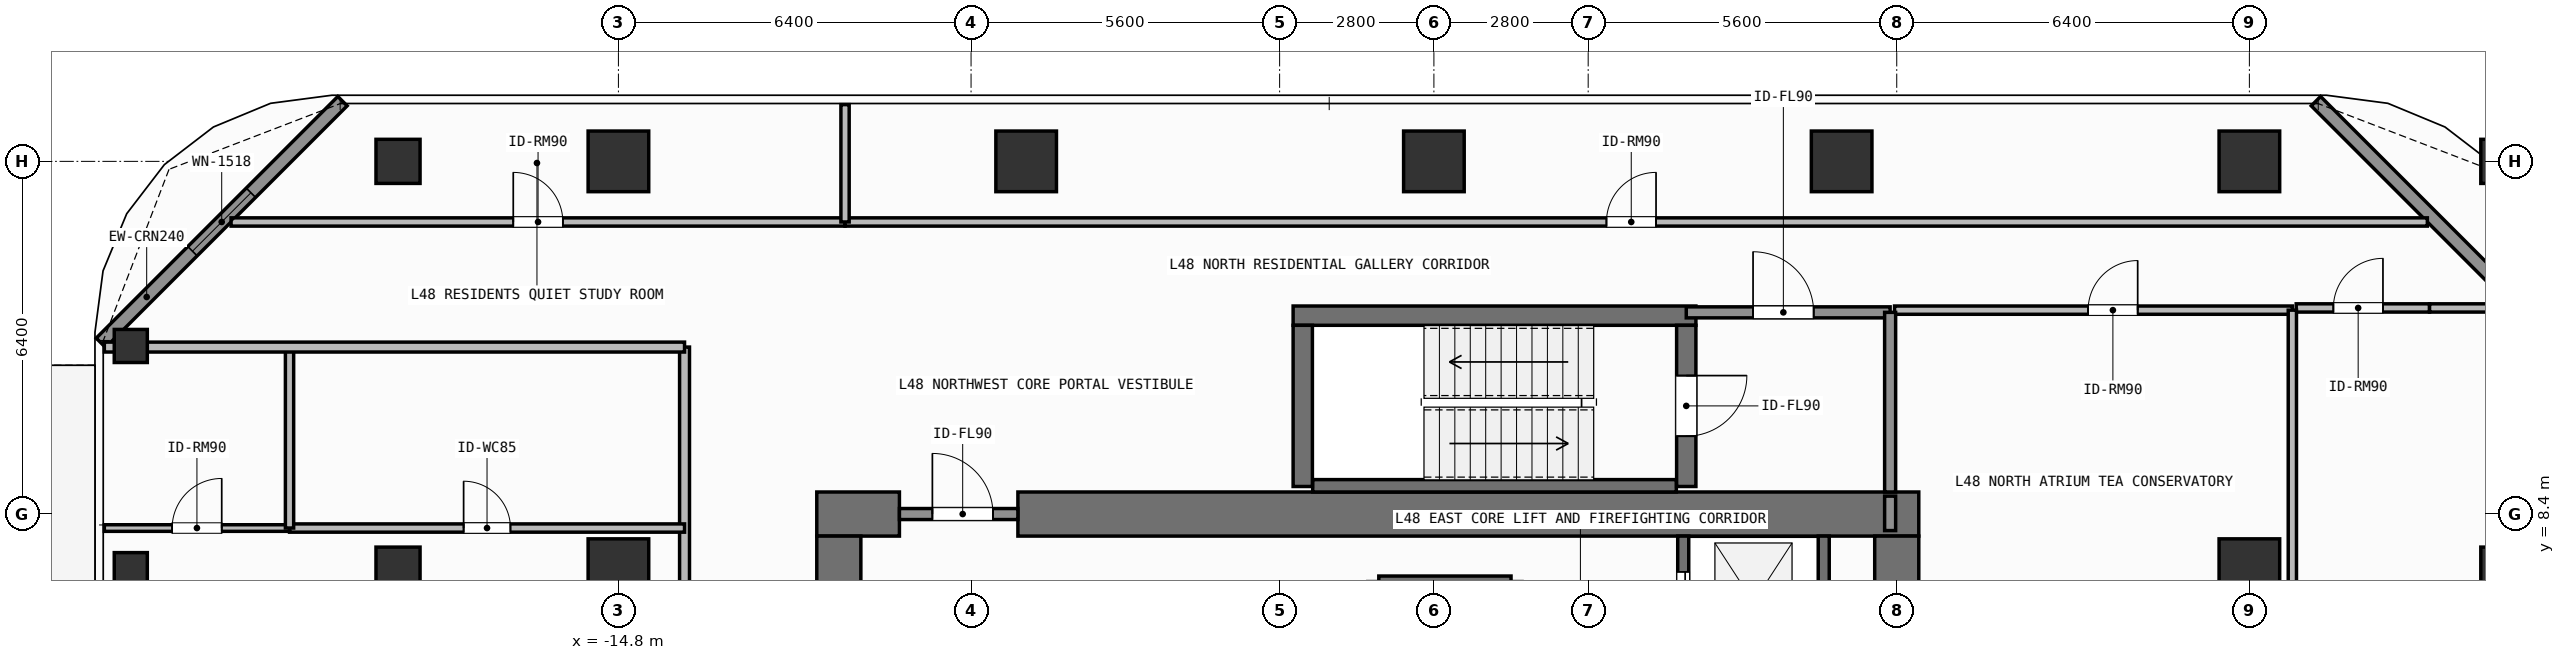
"""IFC4 building model, lengths in metres.
Left out: names, types, materials, properties, quantities, classifications, styles, units other than length and angle.
Written with IfcOpenShell. Run it as: python <this file> out.ifc"""

import sys

from ifc_helpers import new_model, si_unit, direction, frame, frame_2d, origin, origin_2d, place, context, subcontext, project, spatial, rectangle, hollow_rectangle, extrude, element, fill, save


model = new_model("IFC4")
c1 = context("Model", 3, precision=1e-05, world=origin(), true_north=direction((0.0, 1.0)))
c2 = subcontext(c1, "Body", "Model", "MODEL_VIEW")
j1 = project(units=[si_unit("LENGTHUNIT", "METRE"), si_unit("PLANEANGLEUNIT", "RADIAN")], contexts=[c1])
p1 = place(None, origin())
s1 = spatial("IfcSite", under=j1, at=p1, CompositionType="ELEMENT")
p2 = place(p1, origin())
s2 = spatial("IfcBuilding", under=s1, at=p2, CompositionType="ELEMENT")
p3 = place(p2, frame((0.0, 0.0, 195.3)))
s3 = spatial("IfcBuildingStorey", under=s2, at=p3, CompositionType="ELEMENT", Elevation=195.3)
p4 = place(p3, frame((-11.2, 8.4, 0.0), z_axis=(0.0, 0.0, 1.0), x_axis=(1.0, 0.0, 0.0)))
e1 = element("IfcWall", 1, at=p4, inside=s3, PredefinedType="SHEAR", context=c2, shape_type="SweptSolid", body=[
    extrude(rectangle(XDim=1.5, YDim=0.8, at=frame_2d((0.75, 0.0))), origin(), (0.0, 0.0, 1.0), 3.9),
])
p5 = place(p3, frame((-7.55, 8.4, 0.0), z_axis=(0.0, 0.0, 1.0), x_axis=(1.0, 0.0, 0.0)))
e2 = element("IfcWall", 2, at=p5, inside=s3, PredefinedType="SHEAR", context=c2, shape_type="SweptSolid", body=[
    extrude(rectangle(XDim=16.35, YDim=0.8, at=frame_2d((8.175, 0.0))), origin(), (0.0, 0.0, 1.0), 3.9),
])
p6 = place(p3, frame((-10.8, -8.0, 0.0), z_axis=(0.0, 0.0, 1.0), x_axis=(0.0, 1.0, 0.0)))
e3 = element("IfcWall", 3, at=p6, inside=s3, PredefinedType="SHEAR", context=c2, shape_type="SweptSolid", body=[
    extrude(rectangle(XDim=16.0, YDim=0.8, at=frame_2d((8.0, 0.0))), origin(), (0.0, 0.0, 1.0), 3.9),
])
p7 = place(p3, frame((8.4, 5.825, 0.0), z_axis=(0.0, 0.0, 1.0), x_axis=(0.0, 1.0, 0.0)))
e4 = element("IfcWall", 4, at=p7, inside=s3, PredefinedType="SHEAR", context=c2, shape_type="SweptSolid", body=[
    extrude(rectangle(XDim=2.175, YDim=0.8, at=frame_2d((1.087, 0.0))), origin(), (0.0, 0.0, 1.0), 3.9),
])
p8 = place(p3, frame((-2.555, 12.0, 0.0), z_axis=(0.0, 0.0, 1.0), x_axis=(1.0, 0.0, 0.0)))
e5 = element("IfcWall", 5, at=p8, inside=s3, PredefinedType="SHEAR", context=c2, shape_type="SweptSolid", body=[
    extrude(rectangle(XDim=7.31, YDim=0.35, at=frame_2d((3.655, 0.0))), origin(), (0.0, 0.0, 1.0), 3.9),
])
p9 = place(p3, frame((-2.2, 8.913, 0.0), z_axis=(0.0, 0.0, 1.0), x_axis=(1.0, 0.0, 0.0)))
e6 = element("IfcWall", 6, at=p9, inside=s3, PredefinedType="SHEAR", context=c2, shape_type="SweptSolid", body=[
    extrude(rectangle(XDim=6.6, YDim=0.225, at=frame_2d((3.3, 0.0))), origin(), (0.0, 0.0, 1.0), 3.9),
])
p10 = place(p3, frame((-2.38, 8.9, 0.0), z_axis=(0.0, 0.0, 1.0), x_axis=(0.0, 1.0, 0.0)))
e7 = element("IfcWall", 7, at=p10, inside=s3, PredefinedType="SHEAR", context=c2, shape_type="SweptSolid", body=[
    extrude(rectangle(XDim=2.925, YDim=0.35, at=frame_2d((1.462, 0.0))), origin(), (0.0, 0.0, 1.0), 3.9),
])
p11 = place(p3, frame((4.58, 11.825, 0.0), z_axis=(0.0, 0.0, 1.0), x_axis=(0.0, -1.0, 0.0)))
e8 = element("IfcWall", 8, at=p11, inside=s3, PredefinedType="SHEAR", context=c2, shape_type="SweptSolid", body=[
    extrude(rectangle(XDim=2.925, YDim=0.35, at=frame_2d((1.462, 0.0))), origin(), (0.0, 0.0, 1.0), 3.9),
])
p12 = place(p11, frame((0.913, 0.0, 0.0)))
e9 = element("IfcOpeningElement", 9, at=p12, cuts=e8, PredefinedType="OPENING", context=c2, shape_type="SweptSolid", body=[
    extrude(rectangle(XDim=1.1, YDim=2.15, at=frame_2d((0.55, 1.075))), frame((0.0, 0.185, 0.0), z_axis=(0.0, -1.0, 0.0), x_axis=(1.0, 0.0, 0.0)), (0.0, 0.0, 1.0), 0.37),
])
for number, where, z_axis, x_axis in (
    (10, (-14.8, 14.8, 0.0), (0.0, 0.0, 1.0), (1.0, 0.0, 0.0)),
    (11, (-7.4, 14.8, 0.0), (0.0, 0.0, 1.0), (1.0, 0.0, 0.0)),
    (12, (0.0, 14.8, 0.0), (0.0, 0.0, 1.0), (1.0, 0.0, 0.0)),
    (13, (7.4, 14.8, 0.0), (0.0, 0.0, 1.0), (1.0, 0.0, 0.0)),
    (14, (14.8, 14.8, 0.0), (0.0, 0.0, 1.0), (1.0, 0.0, 0.0)),
    (15, (-14.8, 7.4, 0.0), (0.0, 0.0, 1.0), (1.0, 0.0, 0.0)),
    (16, (14.8, 7.4, 0.0), (0.0, 0.0, 1.0), (1.0, 0.0, 0.0)),
):
    element("IfcColumn", number, at=place(p3, frame(where, z_axis=z_axis, x_axis=x_axis)), inside=s3, PredefinedType="COLUMN", context=c2, shape_type="SweptSolid", body=[
        extrude(rectangle(XDim=1.1, YDim=1.1, at=origin_2d()), origin(), (0.0, 0.0, 1.0), 3.9),
    ])
for number, where, z_axis, x_axis in (
    (17, (-18.8, 7.4, 0.0), (0.0, 0.0, 1.0), (1.0, 0.0, 0.0)),
    (18, (-18.8, 14.8, 0.0), (0.0, 0.0, 1.0), (1.0, 0.0, 0.0)),
    (19, (19.4, 7.4, 0.0), (0.0, 0.0, 1.0), (1.0, 0.0, 0.0)),
    (20, (19.4, 14.8, 0.0), (0.0, 0.0, 1.0), (1.0, 0.0, 0.0)),
):
    element("IfcColumn", number, at=place(p3, frame(where, z_axis=z_axis, x_axis=x_axis)), inside=s3, PredefinedType="COLUMN", context=c2, shape_type="SweptSolid", body=[
        extrude(hollow_rectangle(XDim=0.8, YDim=0.8, WallThickness=0.036, at=origin_2d()), origin(), (0.0, 0.0, 1.0), 3.9),
    ])
for number, where, z_axis, x_axis in (
    (21, (-23.65, 11.45, 0.0), (0.0, 0.0, 1.0), (1.0, 0.0, 0.0)),
    (22, (-23.65, 7.4, 0.0), (0.0, 0.0, 1.0), (1.0, 0.0, 0.0)),
):
    element("IfcColumn", number, at=place(p3, frame(where, z_axis=z_axis, x_axis=x_axis)), inside=s3, PredefinedType="COLUMN", context=c2, shape_type="SweptSolid", body=[
        extrude(hollow_rectangle(XDim=0.6, YDim=0.6, WallThickness=0.028, at=origin_2d()), origin(), (0.0, 0.0, 1.0), 3.9),
    ])
p13 = place(p3, frame((-24.192, 11.508, 0.0), z_axis=(0.0, 0.0, 1.0), x_axis=(0.707106781187, 0.707106781187, 0.0)))
e23 = element("IfcWall", 23, at=p13, inside=s3, PredefinedType="SOLIDWALL", context=c2, shape_type="SweptSolid", body=[
    extrude(rectangle(XDim=6.201, YDim=0.24, at=frame_2d((3.101, 0.0))), origin(), (0.0, 0.0, 1.0), 3.68),
])
p14 = place(p13, frame((2.351, 0.0, 0.8)))
e24 = element("IfcOpeningElement", 24, at=p14, cuts=e23, PredefinedType="OPENING", context=c2, shape_type="SweptSolid", body=[
    extrude(rectangle(XDim=1.5, YDim=1.85, at=frame_2d((0.75, 0.925))), frame((0.0, 0.13, 0.0), z_axis=(0.0, -1.0, 0.0), x_axis=(1.0, 0.0, 0.0)), (0.0, 0.0, 1.0), 0.26),
])
p15 = place(p3, frame((16.008, 15.892, 0.0), z_axis=(0.0, 0.0, 1.0), x_axis=(0.707106781187, -0.707106781187, 0.0)))
e25 = element("IfcWall", 25, at=p15, inside=s3, PredefinedType="SOLIDWALL", context=c2, shape_type="SweptSolid", body=[
    extrude(rectangle(XDim=6.201, YDim=0.24, at=frame_2d((3.101, 0.0))), origin(), (0.0, 0.0, 1.0), 3.68),
])
p16 = place(p3, frame((-1.0, 7.175, 0.0), z_axis=(0.0, 0.0, 1.0), x_axis=(1.0, 0.0, 0.0)))
e26 = element("IfcWall", 26, at=p16, inside=s3, PredefinedType="SHEAR", context=c2, shape_type="SweptSolid", body=[
    extrude(rectangle(XDim=2.4, YDim=0.2, at=frame_2d((1.2, 0.0))), origin(), (0.0, 0.0, 1.0), 3.68),
])
p17 = place(p3, frame((4.525, 5.825, 0.0), z_axis=(0.0, 0.0, 1.0), x_axis=(0.0, 1.0, 0.0)))
e27 = element("IfcWall", 27, at=p17, inside=s3, PredefinedType="SHEAR", context=c2, shape_type="SweptSolid", body=[
    extrude(rectangle(XDim=2.175, YDim=0.2, at=frame_2d((1.087, 0.0))), origin(), (0.0, 0.0, 1.0), 3.68),
])
p18 = place(p17, frame((0.425, 0.0, 0.0)))
e28 = element("IfcOpeningElement", 28, at=p18, cuts=e27, PredefinedType="OPENING", context=c2, shape_type="SweptSolid", body=[
    extrude(rectangle(XDim=1.1, YDim=2.2, at=frame_2d((0.55, 1.1))), frame((0.0, 0.11, 0.0), z_axis=(0.0, -1.0, 0.0), x_axis=(1.0, 0.0, 0.0)), (0.0, 0.0, 1.0), 0.22),
])
p19 = place(p3, frame((7.075, 5.825, 0.0), z_axis=(0.0, 0.0, 1.0), x_axis=(0.0, 1.0, 0.0)))
e29 = element("IfcWall", 29, at=p19, inside=s3, PredefinedType="SHEAR", context=c2, shape_type="SweptSolid", body=[
    extrude(rectangle(XDim=2.175, YDim=0.2, at=frame_2d((1.087, 0.0))), origin(), (0.0, 0.0, 1.0), 3.68),
])
p20 = place(p3, frame((4.58, 12.06, 0.0), z_axis=(0.0, 0.0, 1.0), x_axis=(1.0, 0.0, 0.0)))
e30 = element("IfcWall", 30, at=p20, inside=s3, PredefinedType="SOLIDWALL", context=c2, shape_type="SweptSolid", body=[
    extrude(rectangle(XDim=3.7, YDim=0.2, at=frame_2d((1.85, 0.0))), origin(), (0.0, 0.0, 1.0), 3.68),
])
p21 = place(p20, frame((1.212, 0.0, 0.0)))
e31 = element("IfcOpeningElement", 31, at=p21, cuts=e30, PredefinedType="OPENING", context=c2, shape_type="SweptSolid", body=[
    extrude(rectangle(XDim=1.1, YDim=2.15, at=frame_2d((0.55, 1.075))), frame((0.0, 0.11, 0.0), z_axis=(0.0, -1.0, 0.0), x_axis=(1.0, 0.0, 0.0)), (0.0, 0.0, 1.0), 0.22),
])
p22 = place(p3, frame((-9.7, 8.4, 0.0), z_axis=(0.0, 0.0, 1.0), x_axis=(1.0, 0.0, 0.0)))
e32 = element("IfcWall", 32, at=p22, inside=s3, PredefinedType="SOLIDWALL", context=c2, shape_type="SweptSolid", body=[
    extrude(rectangle(XDim=2.15, YDim=0.2, at=frame_2d((1.075, 0.0))), origin(), (0.0, 0.0, 1.0), 2.82),
])
p23 = place(p22, frame((0.598, 0.0, 0.0)))
e33 = element("IfcOpeningElement", 33, at=p23, cuts=e32, PredefinedType="OPENING", context=c2, shape_type="SweptSolid", body=[
    extrude(rectangle(XDim=1.1, YDim=2.15, at=frame_2d((0.55, 1.075))), frame((0.0, 0.11, 0.0), z_axis=(0.0, -1.0, 0.0), x_axis=(1.0, 0.0, 0.0)), (0.0, 0.0, 1.0), 0.22),
])
p24 = place(p3, frame((8.36, 12.1, 0.0), z_axis=(0.0, 0.0, 1.0), x_axis=(1.0, 0.0, 0.0)))
e34 = element("IfcWall", 34, at=p24, inside=s3, PredefinedType="PARTITIONING", context=c2, shape_type="SweptSolid", body=[
    extrude(rectangle(XDim=7.22, YDim=0.15, at=frame_2d((3.61, 0.0))), origin(), (0.0, 0.0, 1.0), 3.68),
])
p25 = place(p24, frame((3.513, 0.0, 0.0)))
e35 = element("IfcOpeningElement", 35, at=p25, cuts=e34, PredefinedType="OPENING", context=c2, shape_type="SweptSolid", body=[
    extrude(rectangle(XDim=0.9, YDim=2.1, at=frame_2d((0.45, 1.05))), frame((0.0, 0.085, 0.0), z_axis=(0.0, -1.0, 0.0), x_axis=(1.0, 0.0, 0.0)), (0.0, 0.0, 1.0), 0.17),
])
p26 = place(p3, frame((-21.83, 13.7, 0.0), z_axis=(0.0, 0.0, 1.0), x_axis=(1.0, 0.0, 0.0)))
e36 = element("IfcWall", 36, at=p26, inside=s3, PredefinedType="PARTITIONING", context=c2, shape_type="SweptSolid", body=[
    extrude(rectangle(XDim=11.143, YDim=0.15, at=frame_2d((5.572, 0.0))), origin(), (0.0, 0.0, 1.0), 3.68),
])
p27 = place(p26, frame((5.122, 0.0, 0.0)))
e37 = element("IfcOpeningElement", 37, at=p27, cuts=e36, PredefinedType="OPENING", context=c2, shape_type="SweptSolid", body=[
    extrude(rectangle(XDim=0.9, YDim=2.1, at=frame_2d((0.45, 1.05))), frame((0.0, 0.085, 0.0), z_axis=(0.0, -1.0, 0.0), x_axis=(1.0, 0.0, 0.0)), (0.0, 0.0, 1.0), 0.17),
])
p28 = place(p3, frame((-10.687, 13.7, 0.0), z_axis=(0.0, 0.0, 1.0), x_axis=(1.0, 0.0, 0.0)))
e38 = element("IfcWall", 38, at=p28, inside=s3, PredefinedType="PARTITIONING", context=c2, shape_type="SweptSolid", body=[
    extrude(rectangle(XDim=28.717, YDim=0.15, at=frame_2d((14.358, 0.0))), origin(), (0.0, 0.0, 1.0), 3.68),
])
p29 = place(p28, frame((13.819, 0.0, 0.0)))
e39 = element("IfcOpeningElement", 39, at=p29, cuts=e38, PredefinedType="OPENING", context=c2, shape_type="SweptSolid", body=[
    extrude(rectangle(XDim=0.9, YDim=2.1, at=frame_2d((0.45, 1.05))), frame((0.0, 0.085, 0.0), z_axis=(0.0, -1.0, 0.0), x_axis=(1.0, 0.0, 0.0)), (0.0, 0.0, 1.0), 0.17),
])
p30 = place(p3, frame((-13.6, 0.644, 0.0), z_axis=(0.0, 0.0, 1.0), x_axis=(0.0, 1.0, 0.0)))
e40 = element("IfcWall", 40, at=p30, inside=s3, PredefinedType="PARTITIONING", context=c2, shape_type="SweptSolid", body=[
    extrude(rectangle(XDim=10.786, YDim=0.18, at=frame_2d((5.393, 0.0))), origin(), (0.0, 0.0, 1.0), 3.68),
])
p31 = place(p30, frame((4.982, 0.0, 0.0)))
e41 = element("IfcOpeningElement", 41, at=p31, cuts=e40, PredefinedType="OPENING", context=c2, shape_type="SweptSolid", body=[
    extrude(rectangle(XDim=1.0, YDim=2.2, at=frame_2d((0.5, 1.1))), frame((0.0, 0.1, 0.0), z_axis=(0.0, -1.0, 0.0), x_axis=(1.0, 0.0, 0.0)), (0.0, 0.0, 1.0), 0.2),
])
p32 = place(p3, frame((-20.769, 8.146, 0.0), z_axis=(0.0, 0.0, 1.0), x_axis=(1.0, 0.0, 0.0)))
e42 = element("IfcWall", 42, at=p32, inside=s3, PredefinedType="PARTITIONING", context=c2, shape_type="SweptSolid", body=[
    extrude(rectangle(XDim=7.169, YDim=0.15, at=frame_2d((3.584, 0.0))), origin(), (0.0, 0.0, 1.0), 3.68),
])
p33 = place(p32, frame((3.159, 0.0, 0.0)))
e43 = element("IfcOpeningElement", 43, at=p33, cuts=e42, PredefinedType="OPENING", context=c2, shape_type="SweptSolid", body=[
    extrude(rectangle(XDim=0.85, YDim=2.1, at=frame_2d((0.425, 1.05))), frame((0.0, 0.085, 0.0), z_axis=(0.0, -1.0, 0.0), x_axis=(1.0, 0.0, 0.0)), (0.0, 0.0, 1.0), 0.17),
])
p34 = place(p3, frame((-24.13, 8.146, 0.0), z_axis=(0.0, 0.0, 1.0), x_axis=(1.0, 0.0, 0.0)))
e44 = element("IfcWall", 44, at=p34, inside=s3, PredefinedType="PARTITIONING", context=c2, shape_type="SweptSolid", body=[
    extrude(rectangle(XDim=3.361, YDim=0.12, at=frame_2d((1.68, 0.0))), origin(), (0.0, 0.0, 1.0), 3.68),
])
p35 = place(p34, frame((1.23, 0.0, 0.0)))
e45 = element("IfcOpeningElement", 45, at=p35, cuts=e44, PredefinedType="OPENING", context=c2, shape_type="SweptSolid", body=[
    extrude(rectangle(XDim=0.9, YDim=2.1, at=frame_2d((0.45, 1.05))), frame((0.0, 0.07, 0.0), z_axis=(0.0, -1.0, 0.0), x_axis=(1.0, 0.0, 0.0)), (0.0, 0.0, 1.0), 0.14),
])
p36 = place(p3, frame((15.65, 12.14, 0.0), z_axis=(0.0, 0.0, 1.0), x_axis=(1.0, 0.0, 0.0)))
e46 = element("IfcWall", 46, at=p36, inside=s3, PredefinedType="PARTITIONING", context=c2, shape_type="SweptSolid", body=[
    extrude(rectangle(XDim=2.42, YDim=0.15, at=frame_2d((1.21, 0.0))), origin(), (0.0, 0.0, 1.0), 3.68),
])
p37 = place(p36, frame((0.674, 0.0, 0.0)))
e47 = element("IfcOpeningElement", 47, at=p37, cuts=e46, PredefinedType="OPENING", context=c2, shape_type="SweptSolid", body=[
    extrude(rectangle(XDim=0.9, YDim=2.1, at=frame_2d((0.45, 1.05))), frame((0.0, 0.085, 0.0), z_axis=(0.0, -1.0, 0.0), x_axis=(1.0, 0.0, 0.0)), (0.0, 0.0, 1.0), 0.17),
])
p38 = place(p3, frame((8.28, 8.8, 0.0), z_axis=(0.0, 0.0, 1.0), x_axis=(0.0, 1.0, 0.0)))
e48 = element("IfcWall", 48, at=p38, inside=s3, PredefinedType="SOLIDWALL", context=c2, shape_type="SweptSolid", body=[
    extrude(rectangle(XDim=3.26, YDim=0.2, at=frame_2d((1.63, 0.0))), origin(), (0.0, 0.0, 1.0), 3.68),
])
p39 = place(p3, frame((8.28, 8.1, 0.0), z_axis=(0.0, 0.0, 1.0), x_axis=(0.0, 1.0, 0.0)))
e49 = element("IfcWall", 49, at=p39, inside=s3, PredefinedType="SOLIDWALL", context=c2, shape_type="SweptSolid", body=[
    extrude(rectangle(XDim=0.625, YDim=0.2, at=frame_2d((0.312, 0.0))), origin(), (0.0, 0.0, 1.0), 3.68),
])
p40 = place(p3, frame((15.58, 5.85, 0.0), z_axis=(0.0, 0.0, 1.0), x_axis=(0.0, 1.0, 0.0)))
e50 = element("IfcWall", 50, at=p40, inside=s3, PredefinedType="PARTITIONING", context=c2, shape_type="SweptSolid", body=[
    extrude(rectangle(XDim=6.25, YDim=0.15, at=frame_2d((3.125, 0.0))), origin(), (0.0, 0.0, 1.0), 3.68),
])
p41 = place(p3, frame((-10.687, 13.7, 0.0), z_axis=(0.0, 0.0, 1.0), x_axis=(0.0, 1.0, 0.0)))
e51 = element("IfcWall", 51, at=p41, inside=s3, PredefinedType="PARTITIONING", context=c2, shape_type="SweptSolid", body=[
    extrude(rectangle(XDim=2.13, YDim=0.15, at=frame_2d((1.065, 0.0))), origin(), (0.0, 0.0, 1.0), 3.68),
])
p42 = place(p3, frame((-20.769, 8.146, 0.0), z_axis=(0.0, 0.0, 1.0), x_axis=(0.0, 1.0, 0.0)))
e52 = element("IfcWall", 52, at=p42, inside=s3, PredefinedType="PARTITIONING", context=c2, shape_type="SweptSolid", body=[
    extrude(rectangle(XDim=3.284, YDim=0.15, at=frame_2d((1.642, 0.0))), origin(), (0.0, 0.0, 1.0), 3.68),
])
p43 = place(p3, frame((-24.13, 11.43, 0.0), z_axis=(0.0, 0.0, 1.0), x_axis=(1.0, 0.0, 0.0)))
e53 = element("IfcWall", 53, at=p43, inside=s3, PredefinedType="PARTITIONING", context=c2, shape_type="SweptSolid", body=[
    extrude(rectangle(XDim=10.53, YDim=0.18, at=frame_2d((5.265, 0.0))), origin(), (0.0, 0.0, 1.0), 3.42),
])
p44 = place(p3, frame((18.07, 12.14, 0.0), z_axis=(0.0, 0.0, 1.0), x_axis=(1.0, 0.0, 0.0)))
e54 = element("IfcWall", 54, at=p44, inside=s3, PredefinedType="PARTITIONING", context=c2, shape_type="SweptSolid", body=[
    extrude(rectangle(XDim=1.52, YDim=0.15, at=frame_2d((0.76, 0.0))), origin(), (0.0, 0.0, 1.0), 3.68),
])
p45 = place(p14, origin())
e55 = element("IfcWindow", 55, at=p45, inside=s3, PartitioningType="SINGLE_PANEL", PredefinedType="WINDOW", context=c2, shape_type="SweptSolid", body=[
    extrude(rectangle(XDim=1.5, YDim=1.85, at=frame_2d((0.75, 0.925))), frame((0.0, 0.03, 0.0), z_axis=(0.0, -1.0, 0.0), x_axis=(1.0, 0.0, 0.0)), (0.0, 0.0, 1.0), 0.06),
])
fill(e24, e55)
p46 = place(p18, origin())
e56 = element("IfcDoor", 56, at=p46, inside=s3, OperationType="SLIDING_TO_LEFT", PredefinedType="DOOR", context=c2, shape_type="SweptSolid", body=[
    extrude(rectangle(XDim=1.1, YDim=2.2, at=frame_2d((0.55, 1.1))), frame((0.0, 0.025, 0.0), z_axis=(0.0, -1.0, 0.0), x_axis=(1.0, 0.0, 0.0)), (0.0, 0.0, 1.0), 0.05),
])
fill(e28, e56)
p47 = place(p12, origin())
e57 = element("IfcDoor", 57, at=p47, inside=s3, OperationType="SINGLE_SWING_LEFT", PredefinedType="DOOR", context=c2, shape_type="SweptSolid", body=[
    extrude(rectangle(XDim=1.1, YDim=2.15, at=frame_2d((0.55, 1.075))), frame((0.0, 0.025, 0.0), z_axis=(0.0, -1.0, 0.0), x_axis=(1.0, 0.0, 0.0)), (0.0, 0.0, 1.0), 0.05),
])
fill(e9, e57)
p48 = place(p21, origin())
e58 = element("IfcDoor", 58, at=p48, inside=s3, OperationType="SINGLE_SWING_LEFT", PredefinedType="DOOR", context=c2, shape_type="SweptSolid", body=[
    extrude(rectangle(XDim=1.1, YDim=2.15, at=frame_2d((0.55, 1.075))), frame((0.0, 0.025, 0.0), z_axis=(0.0, -1.0, 0.0), x_axis=(1.0, 0.0, 0.0)), (0.0, 0.0, 1.0), 0.05),
])
fill(e31, e58)
p49 = place(p23, origin())
e59 = element("IfcDoor", 59, at=p49, inside=s3, OperationType="SINGLE_SWING_LEFT", PredefinedType="DOOR", context=c2, shape_type="SweptSolid", body=[
    extrude(rectangle(XDim=1.1, YDim=2.15, at=frame_2d((0.55, 1.075))), frame((0.0, 0.025, 0.0), z_axis=(0.0, -1.0, 0.0), x_axis=(1.0, 0.0, 0.0)), (0.0, 0.0, 1.0), 0.05),
])
fill(e33, e59)
p50 = place(p25, origin())
e60 = element("IfcDoor", 60, at=p50, inside=s3, OperationType="SINGLE_SWING_RIGHT", PredefinedType="DOOR", context=c2, shape_type="SweptSolid", body=[
    extrude(rectangle(XDim=0.9, YDim=2.1, at=frame_2d((0.45, 1.05))), frame((0.0, 0.025, 0.0), z_axis=(0.0, -1.0, 0.0), x_axis=(1.0, 0.0, 0.0)), (0.0, 0.0, 1.0), 0.05),
])
fill(e35, e60)
p51 = place(p27, origin())
e61 = element("IfcDoor", 61, at=p51, inside=s3, OperationType="SINGLE_SWING_LEFT", PredefinedType="DOOR", context=c2, shape_type="SweptSolid", body=[
    extrude(rectangle(XDim=0.9, YDim=2.1, at=frame_2d((0.45, 1.05))), frame((0.0, 0.025, 0.0), z_axis=(0.0, -1.0, 0.0), x_axis=(1.0, 0.0, 0.0)), (0.0, 0.0, 1.0), 0.05),
])
fill(e37, e61)
p52 = place(p29, origin())
e62 = element("IfcDoor", 62, at=p52, inside=s3, OperationType="SINGLE_SWING_RIGHT", PredefinedType="DOOR", context=c2, shape_type="SweptSolid", body=[
    extrude(rectangle(XDim=0.9, YDim=2.1, at=frame_2d((0.45, 1.05))), frame((0.0, 0.025, 0.0), z_axis=(0.0, -1.0, 0.0), x_axis=(1.0, 0.0, 0.0)), (0.0, 0.0, 1.0), 0.05),
])
fill(e39, e62)
p53 = place(p33, origin())
e63 = element("IfcDoor", 63, at=p53, inside=s3, OperationType="SINGLE_SWING_LEFT", PredefinedType="DOOR", context=c2, shape_type="SweptSolid", body=[
    extrude(rectangle(XDim=0.85, YDim=2.1, at=frame_2d((0.425, 1.05))), frame((0.0, 0.025, 0.0), z_axis=(0.0, -1.0, 0.0), x_axis=(1.0, 0.0, 0.0)), (0.0, 0.0, 1.0), 0.05),
])
fill(e43, e63)
p54 = place(p35, origin())
e64 = element("IfcDoor", 64, at=p54, inside=s3, OperationType="SINGLE_SWING_RIGHT", PredefinedType="DOOR", context=c2, shape_type="SweptSolid", body=[
    extrude(rectangle(XDim=0.9, YDim=2.1, at=frame_2d((0.45, 1.05))), frame((0.0, 0.025, 0.0), z_axis=(0.0, -1.0, 0.0), x_axis=(1.0, 0.0, 0.0)), (0.0, 0.0, 1.0), 0.05),
])
fill(e45, e64)
p55 = place(p37, origin())
e65 = element("IfcDoor", 65, at=p55, inside=s3, OperationType="SINGLE_SWING_RIGHT", PredefinedType="DOOR", context=c2, shape_type="SweptSolid", body=[
    extrude(rectangle(XDim=0.9, YDim=2.1, at=frame_2d((0.45, 1.05))), frame((0.0, 0.025, 0.0), z_axis=(0.0, -1.0, 0.0), x_axis=(1.0, 0.0, 0.0)), (0.0, 0.0, 1.0), 0.05),
])
fill(e47, e65)
save(model, sys.argv[1])
